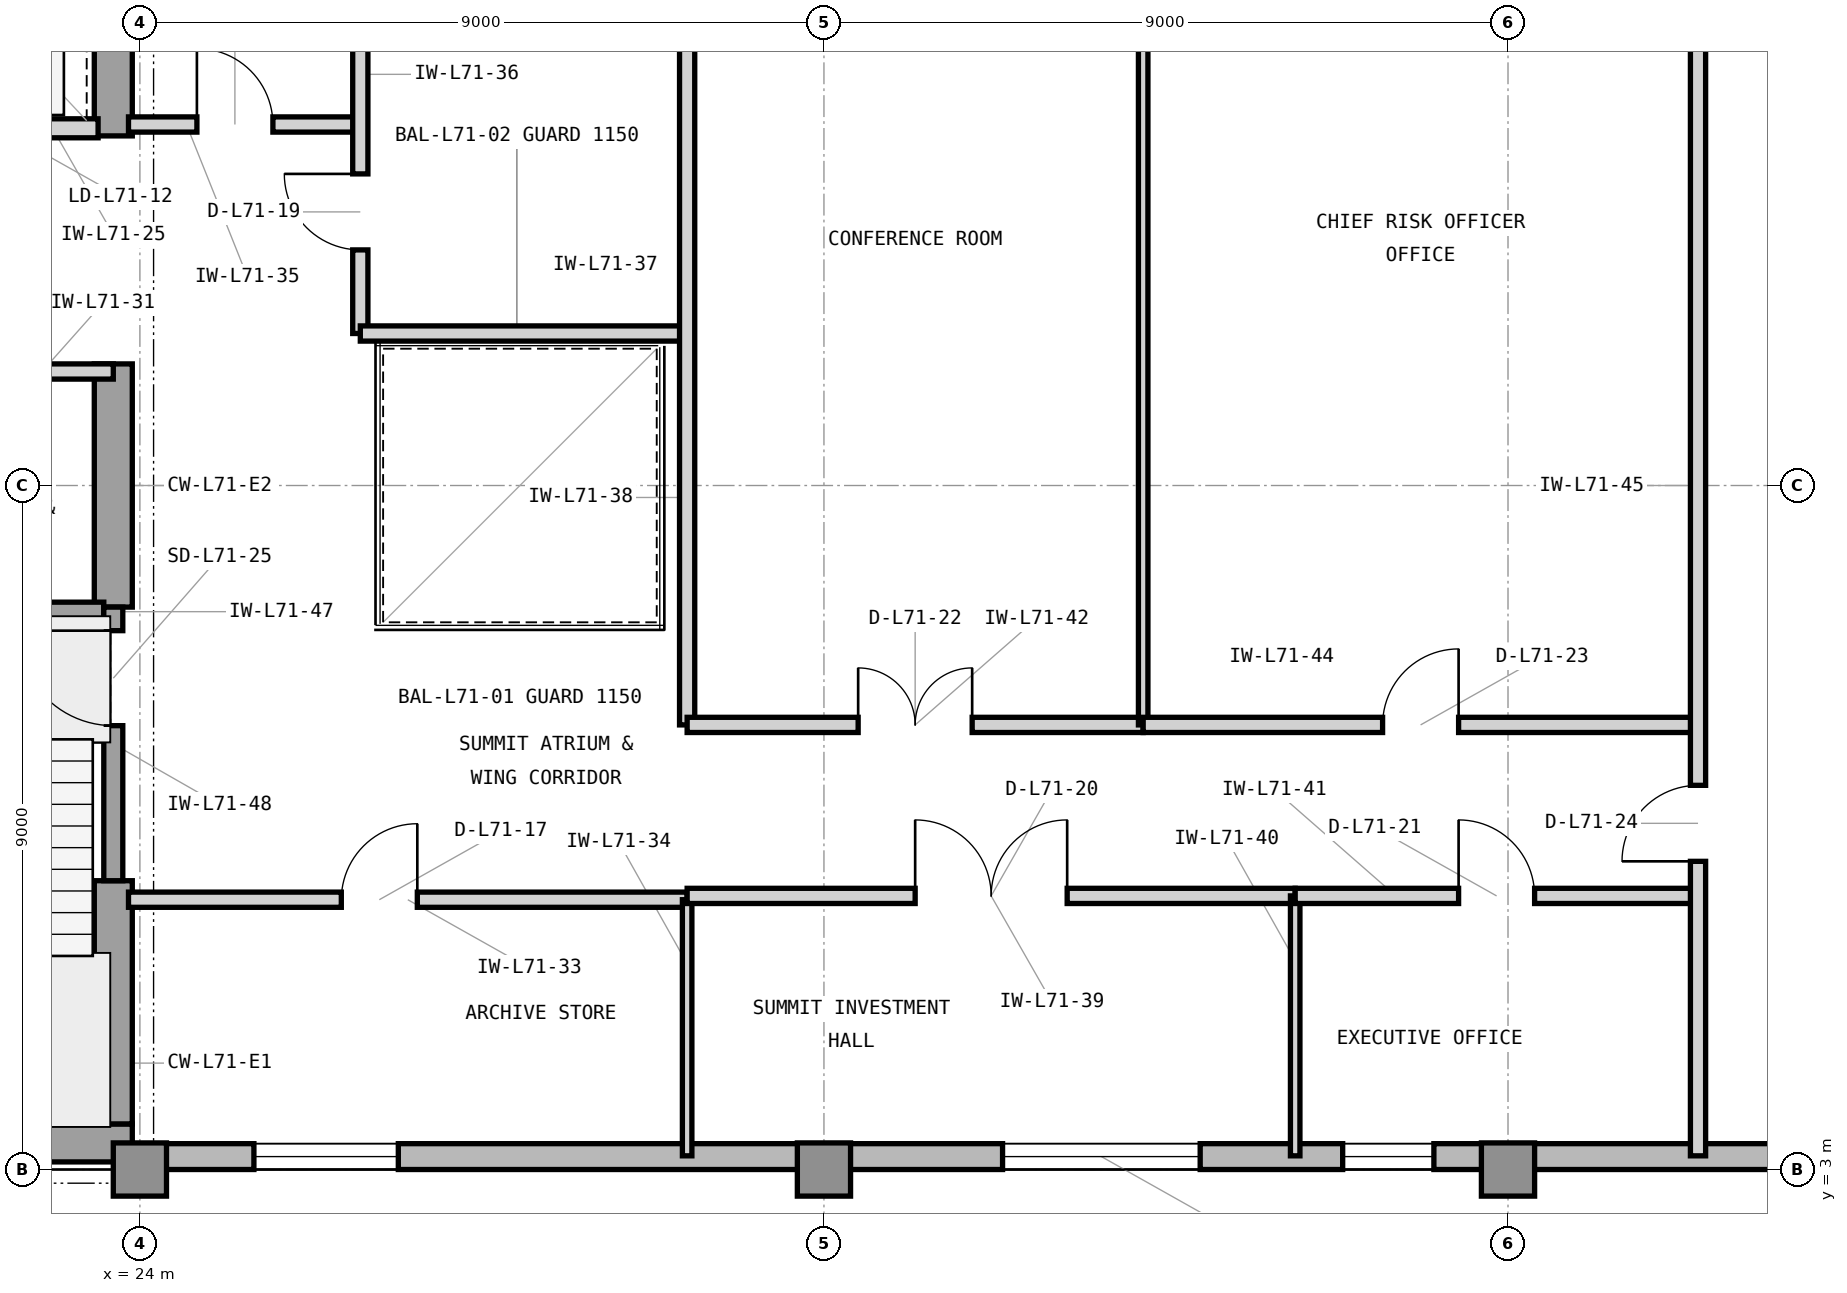
"""IFC4 building model, lengths in metres.
Left out: names, types, materials, properties, quantities, classifications, styles, units other than length and angle.
Written with IfcOpenShell. Run it as: python <this file> out.ifc"""

import sys

from ifc_helpers import new_model, si_unit, direction, frame, frame_2d, origin, origin_2d, place, context, subcontext, project, spatial, rectangle, extrude, element, fill, save


model = new_model("IFC4")
c1 = context("Model", 3, precision=1e-05, world=origin(), true_north=direction((0.0, 1.0)))
c2 = subcontext(c1, "Body", "Model", "MODEL_VIEW")
j1 = project(units=[si_unit("LENGTHUNIT", "METRE"), si_unit("PLANEANGLEUNIT", "RADIAN")], contexts=[c1])
p1 = place(None, origin())
s1 = spatial("IfcSite", under=j1, at=p1, CompositionType="ELEMENT")
p2 = place(p1, origin())
s2 = spatial("IfcBuilding", under=s1, at=p2, CompositionType="ELEMENT")
p3 = place(p2, frame((0.0, 0.0, 289.8)))
s3 = spatial("IfcBuildingStorey", under=s2, at=p3, CompositionType="ELEMENT", Elevation=289.8)
p4 = place(p3, frame((7.475, 3.35, 0.0), z_axis=(0.0, 0.0, 1.0), x_axis=(1.0, 0.0, 0.0)))
e1 = element("IfcWall", 1, at=p4, inside=s3, PredefinedType="SHEAR", context=c2, shape_type="SweptSolid", body=[
    extrude(rectangle(XDim=16.425, YDim=0.5, at=frame_2d((8.212, 0.0))), origin(), (0.0, 0.0, 1.0), 3.9),
])
p5 = place(p3, frame((23.65, 3.6, 0.0), z_axis=(0.0, 0.0, 1.0), x_axis=(0.0, 1.0, 0.0)))
e2 = element("IfcWall", 2, at=p5, inside=s3, PredefinedType="SHEAR", context=c2, shape_type="SweptSolid", body=[
    extrude(rectangle(XDim=3.2, YDim=0.5, at=frame_2d((1.6, 0.0))), origin(), (0.0, 0.0, 1.0), 3.9),
])
p6 = place(p3, frame((23.65, 10.4, 0.0), z_axis=(0.0, 0.0, 1.0), x_axis=(0.0, 1.0, 0.0)))
e3 = element("IfcWall", 3, at=p6, inside=s3, PredefinedType="SHEAR", context=c2, shape_type="SweptSolid", body=[
    extrude(rectangle(XDim=3.2, YDim=0.5, at=frame_2d((1.6, 0.0))), origin(), (0.0, 0.0, 1.0), 3.9),
])
p7 = place(p3, frame((23.65, 16.6, 0.0), z_axis=(0.0, 0.0, 1.0), x_axis=(0.0, 1.0, 0.0)))
e4 = element("IfcWall", 4, at=p7, inside=s3, PredefinedType="SHEAR", context=c2, shape_type="SweptSolid", body=[
    extrude(rectangle(XDim=4.05, YDim=0.5, at=frame_2d((2.025, 0.0))), origin(), (0.0, 0.0, 1.0), 3.9),
])
for number, where, z_axis, x_axis in (
    (5, (24.0, 3.0, 0.0), (0.0, 0.0, 1.0), (1.0, 0.0, 0.0)),
    (6, (33.0, 3.0, 0.0), (0.0, 0.0, 1.0), (1.0, 0.0, 0.0)),
    (7, (42.0, 3.0, 0.0), (0.0, 0.0, 1.0), (1.0, 0.0, 0.0)),
):
    element("IfcColumn", number, at=place(p3, frame(where, z_axis=z_axis, x_axis=x_axis)), inside=s3, PredefinedType="COLUMN", context=c2, shape_type="SweptSolid", body=[
        extrude(rectangle(XDim=0.7, YDim=0.7, at=origin_2d()), origin(), (0.0, 0.0, 1.0), 3.9),
    ])
p8 = place(p3, frame((23.9, 3.17, 0.0), z_axis=(0.0, 0.0, 1.0), x_axis=(1.0, 0.0, 0.0)))
e8 = element("IfcWall", 8, at=p8, inside=s3, PredefinedType="STANDARD", context=c2, shape_type="SweptSolid", body=[
    extrude(rectangle(XDim=25.5, YDim=0.34, at=frame_2d((12.75, 0.0))), origin(), (0.0, 0.0, 1.0), 3.715),
])
p9 = place(p8, frame((1.6, 0.0, 0.8)))
e9 = element("IfcOpeningElement", 9, at=p9, cuts=e8, PredefinedType="OPENING", context=c2, shape_type="SweptSolid", body=[
    extrude(rectangle(XDim=1.9, YDim=2.35, at=frame_2d((0.95, 1.175))), frame((0.0, 0.18, 0.0), z_axis=(0.0, -1.0, 0.0), x_axis=(1.0, 0.0, 0.0)), (0.0, 0.0, 1.0), 0.36),
])
p10 = place(p8, frame((11.45, 0.0, 0.8)))
e10 = element("IfcOpeningElement", 10, at=p10, cuts=e8, PredefinedType="OPENING", context=c2, shape_type="SweptSolid", body=[
    extrude(rectangle(XDim=2.6, YDim=2.35, at=frame_2d((1.3, 1.175))), frame((0.0, 0.18, 0.0), z_axis=(0.0, -1.0, 0.0), x_axis=(1.0, 0.0, 0.0)), (0.0, 0.0, 1.0), 0.36),
])
p11 = place(p8, frame((15.925, 0.0, 0.8)))
e11 = element("IfcOpeningElement", 11, at=p11, cuts=e8, PredefinedType="OPENING", context=c2, shape_type="SweptSolid", body=[
    extrude(rectangle(XDim=1.2, YDim=2.35, at=frame_2d((0.6, 1.175))), frame((0.0, 0.18, 0.0), z_axis=(0.0, -1.0, 0.0), x_axis=(1.0, 0.0, 0.0)), (0.0, 0.0, 1.0), 0.36),
])
p12 = place(p3, frame((21.05, 16.7, 0.0), z_axis=(0.0, 0.0, 1.0), x_axis=(1.0, 0.0, 0.0)))
e12 = element("IfcWall", 12, at=p12, inside=s3, PredefinedType="PARTITIONING", context=c2, shape_type="SweptSolid", body=[
    extrude(rectangle(XDim=2.4, YDim=0.25, at=frame_2d((1.2, 0.0))), origin(), (0.0, 0.0, 1.0), 3.354),
])
p13 = place(p12, frame((0.52, 0.0, 0.0)))
e13 = element("IfcOpeningElement", 13, at=p13, cuts=e12, PredefinedType="OPENING", context=c2, shape_type="SweptSolid", body=[
    extrude(rectangle(XDim=1.15, YDim=2.25, at=frame_2d((0.575, 1.125))), frame((0.0, 0.135, 0.0), z_axis=(0.0, -1.0, 0.0), x_axis=(1.0, 0.0, 0.0)), (0.0, 0.0, 1.0), 0.27),
])
p14 = place(p3, frame((19.9, 13.5, 0.0), z_axis=(0.0, 0.0, 1.0), x_axis=(1.0, 0.0, 0.0)))
e14 = element("IfcWall", 14, at=p14, inside=s3, PredefinedType="PARTITIONING", context=c2, shape_type="SweptSolid", body=[
    extrude(rectangle(XDim=3.75, YDim=0.2, at=frame_2d((1.875, 0.0))), origin(), (0.0, 0.0, 1.0), 3.354),
])
p15 = place(p14, frame((1.4, 0.0, 0.0)))
e15 = element("IfcOpeningElement", 15, at=p15, cuts=e14, PredefinedType="OPENING", context=c2, shape_type="SweptSolid", body=[
    extrude(rectangle(XDim=0.95, YDim=2.1, at=frame_2d((0.475, 1.05))), frame((0.0, 0.11, 0.0), z_axis=(0.0, -1.0, 0.0), x_axis=(1.0, 0.0, 0.0)), (0.0, 0.0, 1.0), 0.22),
])
p16 = place(p3, frame((23.85, 6.55, 0.0), z_axis=(0.0, 0.0, 1.0), x_axis=(1.0, 0.0, 0.0)))
e16 = element("IfcWall", 16, at=p16, inside=s3, PredefinedType="PARTITIONING", context=c2, shape_type="SweptSolid", body=[
    extrude(rectangle(XDim=7.35, YDim=0.2, at=frame_2d((3.675, 0.0))), origin(), (0.0, 0.0, 1.0), 3.705),
])
p17 = place(p16, frame((2.8, 0.0, 0.0)))
e17 = element("IfcOpeningElement", 17, at=p17, cuts=e16, PredefinedType="OPENING", context=c2, shape_type="SweptSolid", body=[
    extrude(rectangle(XDim=1.0, YDim=2.15, at=frame_2d((0.5, 1.075))), frame((0.0, 0.11, 0.0), z_axis=(0.0, -1.0, 0.0), x_axis=(1.0, 0.0, 0.0)), (0.0, 0.0, 1.0), 0.22),
])
p18 = place(p3, frame((31.2, 3.18, 0.0), z_axis=(0.0, 0.0, 1.0), x_axis=(0.0, 1.0, 0.0)))
e18 = element("IfcWall", 18, at=p18, inside=s3, PredefinedType="PARTITIONING", context=c2, shape_type="SweptSolid", body=[
    extrude(rectangle(XDim=3.37, YDim=0.125, at=frame_2d((1.685, 0.0))), origin(), (0.0, 0.0, 1.0), 3.705),
])
p19 = place(p3, frame((23.85, 16.75, 0.0), z_axis=(0.0, 0.0, 1.0), x_axis=(1.0, 0.0, 0.0)))
e19 = element("IfcWall", 19, at=p19, inside=s3, PredefinedType="PARTITIONING", context=c2, shape_type="SweptSolid", body=[
    extrude(rectangle(XDim=3.05, YDim=0.2, at=frame_2d((1.525, 0.0))), origin(), (0.0, 0.0, 1.0), 3.705),
])
p20 = place(p19, frame((0.9, 0.0, 0.0)))
e20 = element("IfcOpeningElement", 20, at=p20, cuts=e19, PredefinedType="OPENING", context=c2, shape_type="SweptSolid", body=[
    extrude(rectangle(XDim=1.0, YDim=2.15, at=frame_2d((0.5, 1.075))), frame((0.0, 0.11, 0.0), z_axis=(0.0, -1.0, 0.0), x_axis=(1.0, 0.0, 0.0)), (0.0, 0.0, 1.0), 0.22),
])
p21 = place(p3, frame((26.9, 14.0, 0.0), z_axis=(0.0, 0.0, 1.0), x_axis=(0.0, 1.0, 0.0)))
e21 = element("IfcWall", 21, at=p21, inside=s3, PredefinedType="PARTITIONING", context=c2, shape_type="SweptSolid", body=[
    extrude(rectangle(XDim=6.82, YDim=0.2, at=frame_2d((3.41, 0.0))), origin(), (0.0, 0.0, 1.0), 3.705),
])
p22 = place(p21, frame((1.1, 0.0, 0.0)))
e22 = element("IfcOpeningElement", 22, at=p22, cuts=e21, PredefinedType="OPENING", context=c2, shape_type="SweptSolid", body=[
    extrude(rectangle(XDim=1.0, YDim=2.15, at=frame_2d((0.5, 1.075))), frame((0.0, 0.11, 0.0), z_axis=(0.0, -1.0, 0.0), x_axis=(1.0, 0.0, 0.0)), (0.0, 0.0, 1.0), 0.22),
])
p23 = place(p3, frame((26.9, 14.0, 0.0), z_axis=(0.0, 0.0, 1.0), x_axis=(1.0, 0.0, 0.0)))
e23 = element("IfcWall", 23, at=p23, inside=s3, PredefinedType="PARTITIONING", context=c2, shape_type="SweptSolid", body=[
    extrude(rectangle(XDim=4.3, YDim=0.2, at=frame_2d((2.15, 0.0))), origin(), (0.0, 0.0, 1.0), 3.705),
])
p24 = place(p3, frame((31.2, 8.85, 0.0), z_axis=(0.0, 0.0, 1.0), x_axis=(0.0, 1.0, 0.0)))
e24 = element("IfcWall", 24, at=p24, inside=s3, PredefinedType="PARTITIONING", context=c2, shape_type="SweptSolid", body=[
    extrude(rectangle(XDim=11.97, YDim=0.2, at=frame_2d((5.985, 0.0))), origin(), (0.0, 0.0, 1.0), 3.705),
])
p25 = place(p3, frame((31.2, 6.6, 0.0), z_axis=(0.0, 0.0, 1.0), x_axis=(1.0, 0.0, 0.0)))
e25 = element("IfcWall", 25, at=p25, inside=s3, PredefinedType="PARTITIONING", context=c2, shape_type="SweptSolid", body=[
    extrude(rectangle(XDim=8.0, YDim=0.2, at=frame_2d((4.0, 0.0))), origin(), (0.0, 0.0, 1.0), 3.705),
])
p26 = place(p25, frame((3.0, 0.0, 0.0)))
e26 = element("IfcOpeningElement", 26, at=p26, cuts=e25, PredefinedType="OPENING", context=c2, shape_type="SweptSolid", body=[
    extrude(rectangle(XDim=2.0, YDim=2.5, at=frame_2d((1.0, 1.25))), frame((0.0, 0.11, 0.0), z_axis=(0.0, -1.0, 0.0), x_axis=(1.0, 0.0, 0.0)), (0.0, 0.0, 1.0), 0.22),
])
p27 = place(p3, frame((39.2, 3.18, 0.0), z_axis=(0.0, 0.0, 1.0), x_axis=(0.0, 1.0, 0.0)))
e27 = element("IfcWall", 27, at=p27, inside=s3, PredefinedType="PARTITIONING", context=c2, shape_type="SweptSolid", body=[
    extrude(rectangle(XDim=3.42, YDim=0.125, at=frame_2d((1.71, 0.0))), origin(), (0.0, 0.0, 1.0), 3.705),
])
p28 = place(p3, frame((39.2, 6.6, 0.0), z_axis=(0.0, 0.0, 1.0), x_axis=(1.0, 0.0, 0.0)))
e28 = element("IfcWall", 28, at=p28, inside=s3, PredefinedType="PARTITIONING", context=c2, shape_type="SweptSolid", body=[
    extrude(rectangle(XDim=5.3, YDim=0.2, at=frame_2d((2.65, 0.0))), origin(), (0.0, 0.0, 1.0), 3.705),
])
p29 = place(p28, frame((2.15, 0.0, 0.0)))
e29 = element("IfcOpeningElement", 29, at=p29, cuts=e28, PredefinedType="OPENING", context=c2, shape_type="SweptSolid", body=[
    extrude(rectangle(XDim=1.0, YDim=2.15, at=frame_2d((0.5, 1.075))), frame((0.0, 0.11, 0.0), z_axis=(0.0, -1.0, 0.0), x_axis=(1.0, 0.0, 0.0)), (0.0, 0.0, 1.0), 0.22),
])
p30 = place(p3, frame((31.2, 8.85, 0.0), z_axis=(0.0, 0.0, 1.0), x_axis=(1.0, 0.0, 0.0)))
e30 = element("IfcWall", 30, at=p30, inside=s3, PredefinedType="PARTITIONING", context=c2, shape_type="SweptSolid", body=[
    extrude(rectangle(XDim=6.0, YDim=0.2, at=frame_2d((3.0, 0.0))), origin(), (0.0, 0.0, 1.0), 3.705),
])
p31 = place(p30, frame((2.25, 0.0, 0.0)))
e31 = element("IfcOpeningElement", 31, at=p31, cuts=e30, PredefinedType="OPENING", context=c2, shape_type="SweptSolid", body=[
    extrude(rectangle(XDim=1.5, YDim=2.3, at=frame_2d((0.75, 1.15))), frame((0.0, 0.11, 0.0), z_axis=(0.0, -1.0, 0.0), x_axis=(1.0, 0.0, 0.0)), (0.0, 0.0, 1.0), 0.22),
])
p32 = place(p3, frame((37.2, 8.85, 0.0), z_axis=(0.0, 0.0, 1.0), x_axis=(0.0, 1.0, 0.0)))
e32 = element("IfcWall", 32, at=p32, inside=s3, PredefinedType="PARTITIONING", context=c2, shape_type="SweptSolid", body=[
    extrude(rectangle(XDim=11.97, YDim=0.125, at=frame_2d((5.985, 0.0))), origin(), (0.0, 0.0, 1.0), 3.705),
])
p33 = place(p3, frame((37.2, 8.85, 0.0), z_axis=(0.0, 0.0, 1.0), x_axis=(1.0, 0.0, 0.0)))
e33 = element("IfcWall", 33, at=p33, inside=s3, PredefinedType="PARTITIONING", context=c2, shape_type="SweptSolid", body=[
    extrude(rectangle(XDim=7.3, YDim=0.2, at=frame_2d((3.65, 0.0))), origin(), (0.0, 0.0, 1.0), 3.705),
])
p34 = place(p33, frame((3.15, 0.0, 0.0)))
e34 = element("IfcOpeningElement", 34, at=p34, cuts=e33, PredefinedType="OPENING", context=c2, shape_type="SweptSolid", body=[
    extrude(rectangle(XDim=1.0, YDim=2.15, at=frame_2d((0.5, 1.075))), frame((0.0, 0.11, 0.0), z_axis=(0.0, -1.0, 0.0), x_axis=(1.0, 0.0, 0.0)), (0.0, 0.0, 1.0), 0.22),
])
p35 = place(p3, frame((44.5, 3.18, 0.0), z_axis=(0.0, 0.0, 1.0), x_axis=(0.0, 1.0, 0.0)))
e35 = element("IfcWall", 35, at=p35, inside=s3, PredefinedType="PARTITIONING", context=c2, shape_type="SweptSolid", body=[
    extrude(rectangle(XDim=17.64, YDim=0.2, at=frame_2d((8.82, 0.0))), origin(), (0.0, 0.0, 1.0), 3.705),
])
p36 = place(p35, frame((3.875, 0.0, 0.0)))
e36 = element("IfcOpeningElement", 36, at=p36, cuts=e35, PredefinedType="OPENING", context=c2, shape_type="SweptSolid", body=[
    extrude(rectangle(XDim=1.0, YDim=2.15, at=frame_2d((0.5, 1.075))), frame((0.0, 0.11, 0.0), z_axis=(0.0, -1.0, 0.0), x_axis=(1.0, 0.0, 0.0)), (0.0, 0.0, 1.0), 0.22),
])
p37 = place(p3, frame((19.705, 10.34, 0.0), z_axis=(0.0, 0.0, 1.0), x_axis=(1.0, 0.0, 0.0)))
e37 = element("IfcWall", 37, at=p37, inside=s3, PredefinedType="SHEAR", context=c2, shape_type="SweptSolid", body=[
    extrude(rectangle(XDim=3.82, YDim=0.25, at=frame_2d((1.91, 0.0))), origin(), (0.0, 0.0, 1.0), 3.9),
])
p38 = place(p3, frame((23.65, 6.8, 0.0), z_axis=(0.0, 0.0, 1.0), x_axis=(0.0, 1.0, 0.0)))
e38 = element("IfcWall", 38, at=p38, inside=s3, PredefinedType="SHEAR", context=c2, shape_type="SweptSolid", body=[
    extrude(rectangle(XDim=3.6, YDim=0.25, at=frame_2d((1.8, 0.0))), origin(), (0.0, 0.0, 1.0), 3.9),
])
p39 = place(p38, frame((2.04, 0.0, 0.0)))
e39 = element("IfcOpeningElement", 39, at=p39, cuts=e38, PredefinedType="OPENING", context=c2, shape_type="SweptSolid", body=[
    extrude(rectangle(XDim=1.25, YDim=2.2, at=frame_2d((0.625, 1.1))), frame((0.0, 0.135, 0.0), z_axis=(0.0, -1.0, 0.0), x_axis=(1.0, 0.0, 0.0)), (0.0, 0.0, 1.0), 0.27),
])
p40 = place(p9, origin())
e40 = element("IfcWindow", 40, at=p40, inside=s3, PartitioningType="SINGLE_PANEL", PredefinedType="WINDOW", context=c2, shape_type="SweptSolid", body=[
    extrude(rectangle(XDim=1.9, YDim=2.35, at=frame_2d((0.95, 1.175))), frame((0.0, 0.11, 0.0), z_axis=(0.0, -1.0, 0.0), x_axis=(1.0, 0.0, 0.0)), (0.0, 0.0, 1.0), 0.06),
])
fill(e9, e40)
p41 = place(p10, origin())
e41 = element("IfcWindow", 41, at=p41, inside=s3, PartitioningType="SINGLE_PANEL", PredefinedType="WINDOW", context=c2, shape_type="SweptSolid", body=[
    extrude(rectangle(XDim=2.6, YDim=2.35, at=frame_2d((1.3, 1.175))), frame((0.0, 0.11, 0.0), z_axis=(0.0, -1.0, 0.0), x_axis=(1.0, 0.0, 0.0)), (0.0, 0.0, 1.0), 0.06),
])
fill(e10, e41)
p42 = place(p17, origin())
e42 = element("IfcDoor", 42, at=p42, inside=s3, OperationType="SINGLE_SWING_RIGHT", PredefinedType="DOOR", context=c2, shape_type="SweptSolid", body=[
    extrude(rectangle(XDim=1.0, YDim=2.15, at=frame_2d((0.5, 1.075))), frame((0.0, 0.025, 0.0), z_axis=(0.0, -1.0, 0.0), x_axis=(1.0, 0.0, 0.0)), (0.0, 0.0, 1.0), 0.05),
])
fill(e17, e42)
p43 = place(p20, origin())
e43 = element("IfcDoor", 43, at=p43, inside=s3, OperationType="SINGLE_SWING_LEFT", PredefinedType="DOOR", context=c2, shape_type="SweptSolid", body=[
    extrude(rectangle(XDim=1.0, YDim=2.15, at=frame_2d((0.5, 1.075))), frame((0.0, 0.025, 0.0), z_axis=(0.0, -1.0, 0.0), x_axis=(1.0, 0.0, 0.0)), (0.0, 0.0, 1.0), 0.05),
])
fill(e20, e43)
p44 = place(p22, origin())
e44 = element("IfcDoor", 44, at=p44, inside=s3, OperationType="SINGLE_SWING_RIGHT", PredefinedType="DOOR", context=c2, shape_type="SweptSolid", body=[
    extrude(rectangle(XDim=1.0, YDim=2.15, at=frame_2d((0.5, 1.075))), frame((0.0, 0.025, 0.0), z_axis=(0.0, -1.0, 0.0), x_axis=(1.0, 0.0, 0.0)), (0.0, 0.0, 1.0), 0.05),
])
fill(e22, e44)
p45 = place(p26, origin())
e45 = element("IfcDoor", 45, at=p45, inside=s3, OperationType="DOUBLE_DOOR_SINGLE_SWING", PredefinedType="DOOR", context=c2, shape_type="SweptSolid", body=[
    extrude(rectangle(XDim=2.0, YDim=2.5, at=frame_2d((1.0, 1.25))), frame((0.0, 0.025, 0.0), z_axis=(0.0, -1.0, 0.0), x_axis=(1.0, 0.0, 0.0)), (0.0, 0.0, 1.0), 0.05),
])
fill(e26, e45)
p46 = place(p29, origin())
e46 = element("IfcDoor", 46, at=p46, inside=s3, OperationType="SINGLE_SWING_LEFT", PredefinedType="DOOR", context=c2, shape_type="SweptSolid", body=[
    extrude(rectangle(XDim=1.0, YDim=2.15, at=frame_2d((0.5, 1.075))), frame((0.0, 0.025, 0.0), z_axis=(0.0, -1.0, 0.0), x_axis=(1.0, 0.0, 0.0)), (0.0, 0.0, 1.0), 0.05),
])
fill(e29, e46)
p47 = place(p31, origin())
e47 = element("IfcDoor", 47, at=p47, inside=s3, OperationType="DOUBLE_DOOR_SINGLE_SWING", PredefinedType="DOOR", context=c2, shape_type="SweptSolid", body=[
    extrude(rectangle(XDim=1.5, YDim=2.3, at=frame_2d((0.75, 1.15))), frame((0.0, 0.025, 0.0), z_axis=(0.0, -1.0, 0.0), x_axis=(1.0, 0.0, 0.0)), (0.0, 0.0, 1.0), 0.05),
])
fill(e31, e47)
p48 = place(p34, origin())
e48 = element("IfcDoor", 48, at=p48, inside=s3, OperationType="SINGLE_SWING_RIGHT", PredefinedType="DOOR", context=c2, shape_type="SweptSolid", body=[
    extrude(rectangle(XDim=1.0, YDim=2.15, at=frame_2d((0.5, 1.075))), frame((0.0, 0.025, 0.0), z_axis=(0.0, -1.0, 0.0), x_axis=(1.0, 0.0, 0.0)), (0.0, 0.0, 1.0), 0.05),
])
fill(e34, e48)
p49 = place(p36, origin())
e49 = element("IfcDoor", 49, at=p49, inside=s3, OperationType="SINGLE_SWING_LEFT", PredefinedType="DOOR", context=c2, shape_type="SweptSolid", body=[
    extrude(rectangle(XDim=1.0, YDim=2.15, at=frame_2d((0.5, 1.075))), frame((0.0, 0.025, 0.0), z_axis=(0.0, -1.0, 0.0), x_axis=(1.0, 0.0, 0.0)), (0.0, 0.0, 1.0), 0.05),
])
fill(e36, e49)
p50 = place(p39, origin())
e50 = element("IfcDoor", 50, at=p50, inside=s3, OperationType="SINGLE_SWING_RIGHT", PredefinedType="DOOR", context=c2, shape_type="SweptSolid", body=[
    extrude(rectangle(XDim=1.25, YDim=2.2, at=frame_2d((0.625, 1.1))), frame((0.0, 0.025, 0.0), z_axis=(0.0, -1.0, 0.0), x_axis=(1.0, 0.0, 0.0)), (0.0, 0.0, 1.0), 0.05),
])
fill(e39, e50)
p51 = place(p11, origin())
e51 = element("IfcWindow", 51, at=p51, inside=s3, PartitioningType="SINGLE_PANEL", PredefinedType="WINDOW", context=c2, shape_type="SweptSolid", body=[
    extrude(rectangle(XDim=1.2, YDim=2.35, at=frame_2d((0.6, 1.175))), frame((0.0, 0.11, 0.0), z_axis=(0.0, -1.0, 0.0), x_axis=(1.0, 0.0, 0.0)), (0.0, 0.0, 1.0), 0.06),
])
fill(e11, e51)
save(model, sys.argv[1])
